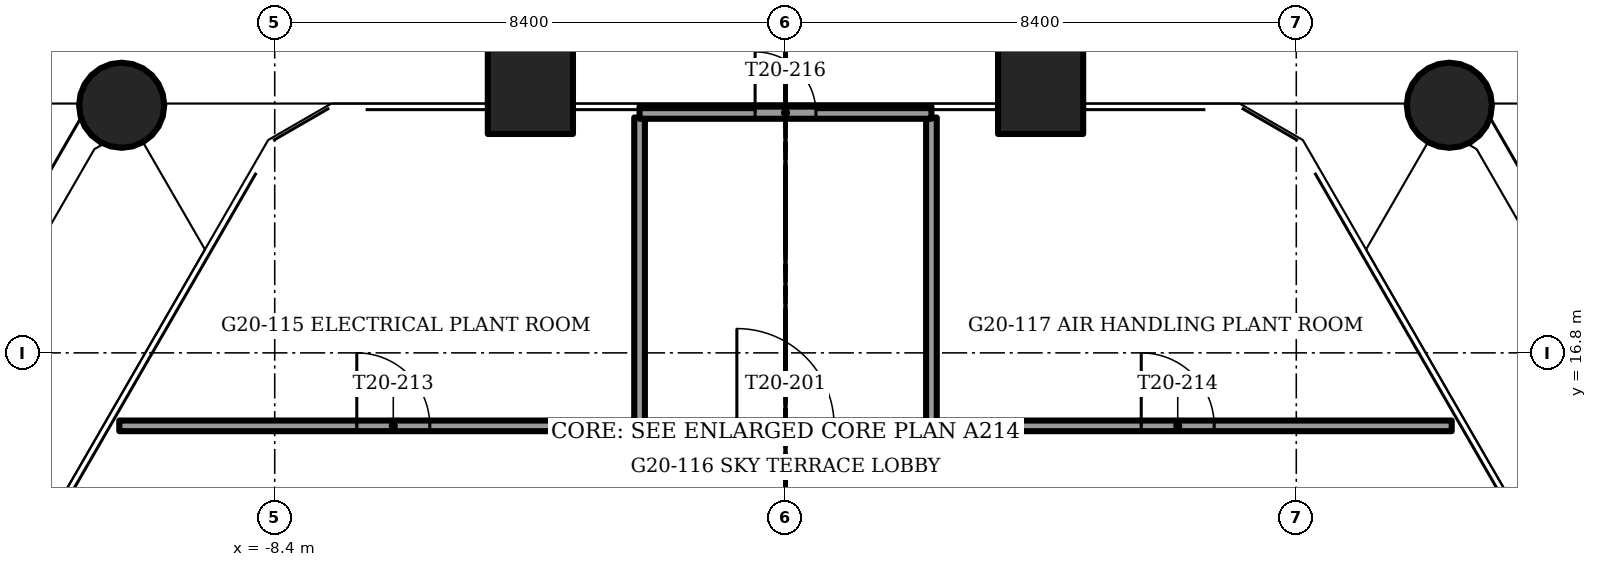
"""IFC4 building model, lengths in metres.
Left out: names, types, materials, properties, quantities, classifications, styles, units other than length and angle.
Written with IfcOpenShell. Run it as: python <this file> out.ifc"""

import sys

from ifc_helpers import new_model, si_unit, direction, frame, frame_2d, origin, origin_2d, place, context, subcontext, project, spatial, rectangle, circle, extrude, element, fill, save


model = new_model("IFC4")
c1 = context("Model", 3, precision=1e-05, world=origin(), true_north=direction((0.0, 1.0)))
c2 = subcontext(c1, "Body", "Model", "MODEL_VIEW")
j1 = project(units=[si_unit("LENGTHUNIT", "METRE"), si_unit("PLANEANGLEUNIT", "RADIAN")], contexts=[c1])
p1 = place(None, origin())
s1 = spatial("IfcSite", under=j1, at=p1, CompositionType="ELEMENT")
p2 = place(p1, origin())
s2 = spatial("IfcBuilding", under=s1, at=p2, CompositionType="ELEMENT")
p3 = place(p2, frame((0.0, 0.0, 80.5)))
s3 = spatial("IfcBuildingStorey", under=s2, at=p3, CompositionType="ELEMENT", Elevation=80.5)
for number, where, z_axis, x_axis in (
    (1, (-10.917, 20.872, -1.2), (0.0, 0.0, 1.0), (1.0, 0.0, 0.0)),
    (2, (10.917, 20.872, -1.2), (0.0, 0.0, 1.0), (1.0, 0.0, 0.0)),
):
    element("IfcColumn", number, at=place(p3, frame(where, z_axis=z_axis, x_axis=x_axis)), inside=s3, PredefinedType="COLUMN", context=c2, shape_type="SweptSolid", body=[
        extrude(circle(Radius=0.7, at=origin_2d()), origin(), (0.0, 0.0, 1.0), 5.0),
    ])
for number, where, z_axis, x_axis in (
    (3, (4.195, 21.1, -1.2), (0.0, 0.0, 1.0), (1.0, 0.0, 0.0)),
    (4, (-4.195, 21.1, -1.2), (0.0, 0.0, 1.0), (1.0, 0.0, 0.0)),
):
    element("IfcColumn", number, at=place(p3, frame(where, z_axis=z_axis, x_axis=x_axis)), inside=s3, PredefinedType="COLUMN", context=c2, shape_type="SweptSolid", body=[
        extrude(rectangle(XDim=1.4, YDim=1.4, at=origin_2d()), origin(), (0.0, 0.0, 1.0), 5.0),
    ])
p4 = place(p3, frame((-10.956, 15.6, 0.0), z_axis=(0.0, 0.0, 1.0), x_axis=(1.0, 0.0, 0.0)))
e5 = element("IfcWall", 5, at=p4, inside=s3, PredefinedType="PARTITIONING", context=c2, shape_type="SweptSolid", body=[
    extrude(rectangle(XDim=21.912, YDim=0.175, at=frame_2d((10.956, 0.0))), origin(), (0.0, 0.0, 1.0), 4.7),
])
p5 = place(p4, frame((10.156, 0.0, 0.0)))
e6 = element("IfcOpeningElement", 6, at=p5, cuts=e5, PredefinedType="OPENING", context=c2, shape_type="SweptSolid", body=[
    extrude(rectangle(XDim=1.6, YDim=2.1, at=frame_2d((0.8, 1.05))), frame((0.0, 0.087, 0.0), z_axis=(0.0, -1.0, 0.0), x_axis=(1.0, 0.0, 0.0)), (0.0, 0.0, 1.0), 0.175),
])
p6 = place(p4, frame((3.906, 0.0, 0.0)))
e7 = element("IfcOpeningElement", 7, at=p6, cuts=e5, PredefinedType="OPENING", context=c2, shape_type="SweptSolid", body=[
    extrude(rectangle(XDim=1.2, YDim=2.1, at=frame_2d((0.6, 1.05))), frame((0.0, 0.087, 0.0), z_axis=(0.0, -1.0, 0.0), x_axis=(1.0, 0.0, 0.0)), (0.0, 0.0, 1.0), 0.175),
])
p7 = place(p4, frame((16.806, 0.0, 0.0)))
e8 = element("IfcOpeningElement", 8, at=p7, cuts=e5, PredefinedType="OPENING", context=c2, shape_type="SweptSolid", body=[
    extrude(rectangle(XDim=1.2, YDim=2.1, at=frame_2d((0.6, 1.05))), frame((0.0, 0.087, 0.0), z_axis=(0.0, -1.0, 0.0), x_axis=(1.0, 0.0, 0.0)), (0.0, 0.0, 1.0), 0.175),
])
for number, where, z_axis, x_axis in (
    (9, (-2.4, 15.6, 0.0), (0.0, 0.0, 1.0), (0.0, 1.0, 0.0)),
    (10, (2.4, 15.6, 0.0), (0.0, 0.0, 1.0), (0.0, 1.0, 0.0)),
):
    element("IfcWall", number, at=place(p3, frame(where, z_axis=z_axis, x_axis=x_axis)), inside=s3, PredefinedType="PARTITIONING", context=c2, shape_type="SweptSolid", body=[
        extrude(rectangle(XDim=5.07, YDim=0.175, at=frame_2d((2.535, 0.0))), origin(), (0.0, 0.0, 1.0), 3.8),
    ])
p8 = place(p3, frame((-2.4, 20.75, 0.0), z_axis=(0.0, 0.0, 1.0), x_axis=(1.0, 0.0, 0.0)))
e11 = element("IfcWall", 11, at=p8, inside=s3, PredefinedType="PARTITIONING", context=c2, shape_type="SweptSolid", body=[
    extrude(rectangle(XDim=4.8, YDim=0.2, at=frame_2d((2.4, 0.0))), origin(), (0.0, 0.0, 1.0), 4.7),
])
p9 = place(p8, frame((1.9, 0.0, 0.0)))
e12 = element("IfcOpeningElement", 12, at=p9, cuts=e11, PredefinedType="OPENING", context=c2, shape_type="SweptSolid", body=[
    extrude(rectangle(XDim=1.0, YDim=2.1, at=frame_2d((0.5, 1.05))), frame((0.0, 0.1, 0.0), z_axis=(0.0, -1.0, 0.0), x_axis=(1.0, 0.0, 0.0)), (0.0, 0.0, 1.0), 0.2),
])
p10 = place(p5, origin())
e13 = element("IfcDoor", 13, at=p10, inside=s3, OperationType="DOUBLE_DOOR_SINGLE_SWING", PredefinedType="DOOR", context=c2, shape_type="SweptSolid", body=[
    extrude(rectangle(XDim=1.6, YDim=2.1, at=frame_2d((0.8, 1.05))), frame((0.0, 0.025, 0.0), z_axis=(0.0, -1.0, 0.0), x_axis=(1.0, 0.0, 0.0)), (0.0, 0.0, 1.0), 0.05),
])
fill(e6, e13)
p11 = place(p6, origin())
e14 = element("IfcDoor", 14, at=p11, inside=s3, OperationType="SINGLE_SWING_LEFT", PredefinedType="DOOR", context=c2, shape_type="SweptSolid", body=[
    extrude(rectangle(XDim=1.2, YDim=2.1, at=frame_2d((0.6, 1.05))), frame((0.0, 0.025, 0.0), z_axis=(0.0, -1.0, 0.0), x_axis=(1.0, 0.0, 0.0)), (0.0, 0.0, 1.0), 0.05),
])
fill(e7, e14)
p12 = place(p7, origin())
e15 = element("IfcDoor", 15, at=p12, inside=s3, OperationType="SINGLE_SWING_RIGHT", PredefinedType="DOOR", context=c2, shape_type="SweptSolid", body=[
    extrude(rectangle(XDim=1.2, YDim=2.1, at=frame_2d((0.6, 1.05))), frame((0.0, 0.025, 0.0), z_axis=(0.0, -1.0, 0.0), x_axis=(1.0, 0.0, 0.0)), (0.0, 0.0, 1.0), 0.05),
])
fill(e8, e15)
p13 = place(p9, origin())
e16 = element("IfcDoor", 16, at=p13, inside=s3, OperationType="SINGLE_SWING_LEFT", PredefinedType="DOOR", context=c2, shape_type="SweptSolid", body=[
    extrude(rectangle(XDim=1.0, YDim=2.1, at=frame_2d((0.5, 1.05))), frame((0.0, 0.025, 0.0), z_axis=(0.0, -1.0, 0.0), x_axis=(1.0, 0.0, 0.0)), (0.0, 0.0, 1.0), 0.05),
])
fill(e12, e16)
save(model, sys.argv[1])
